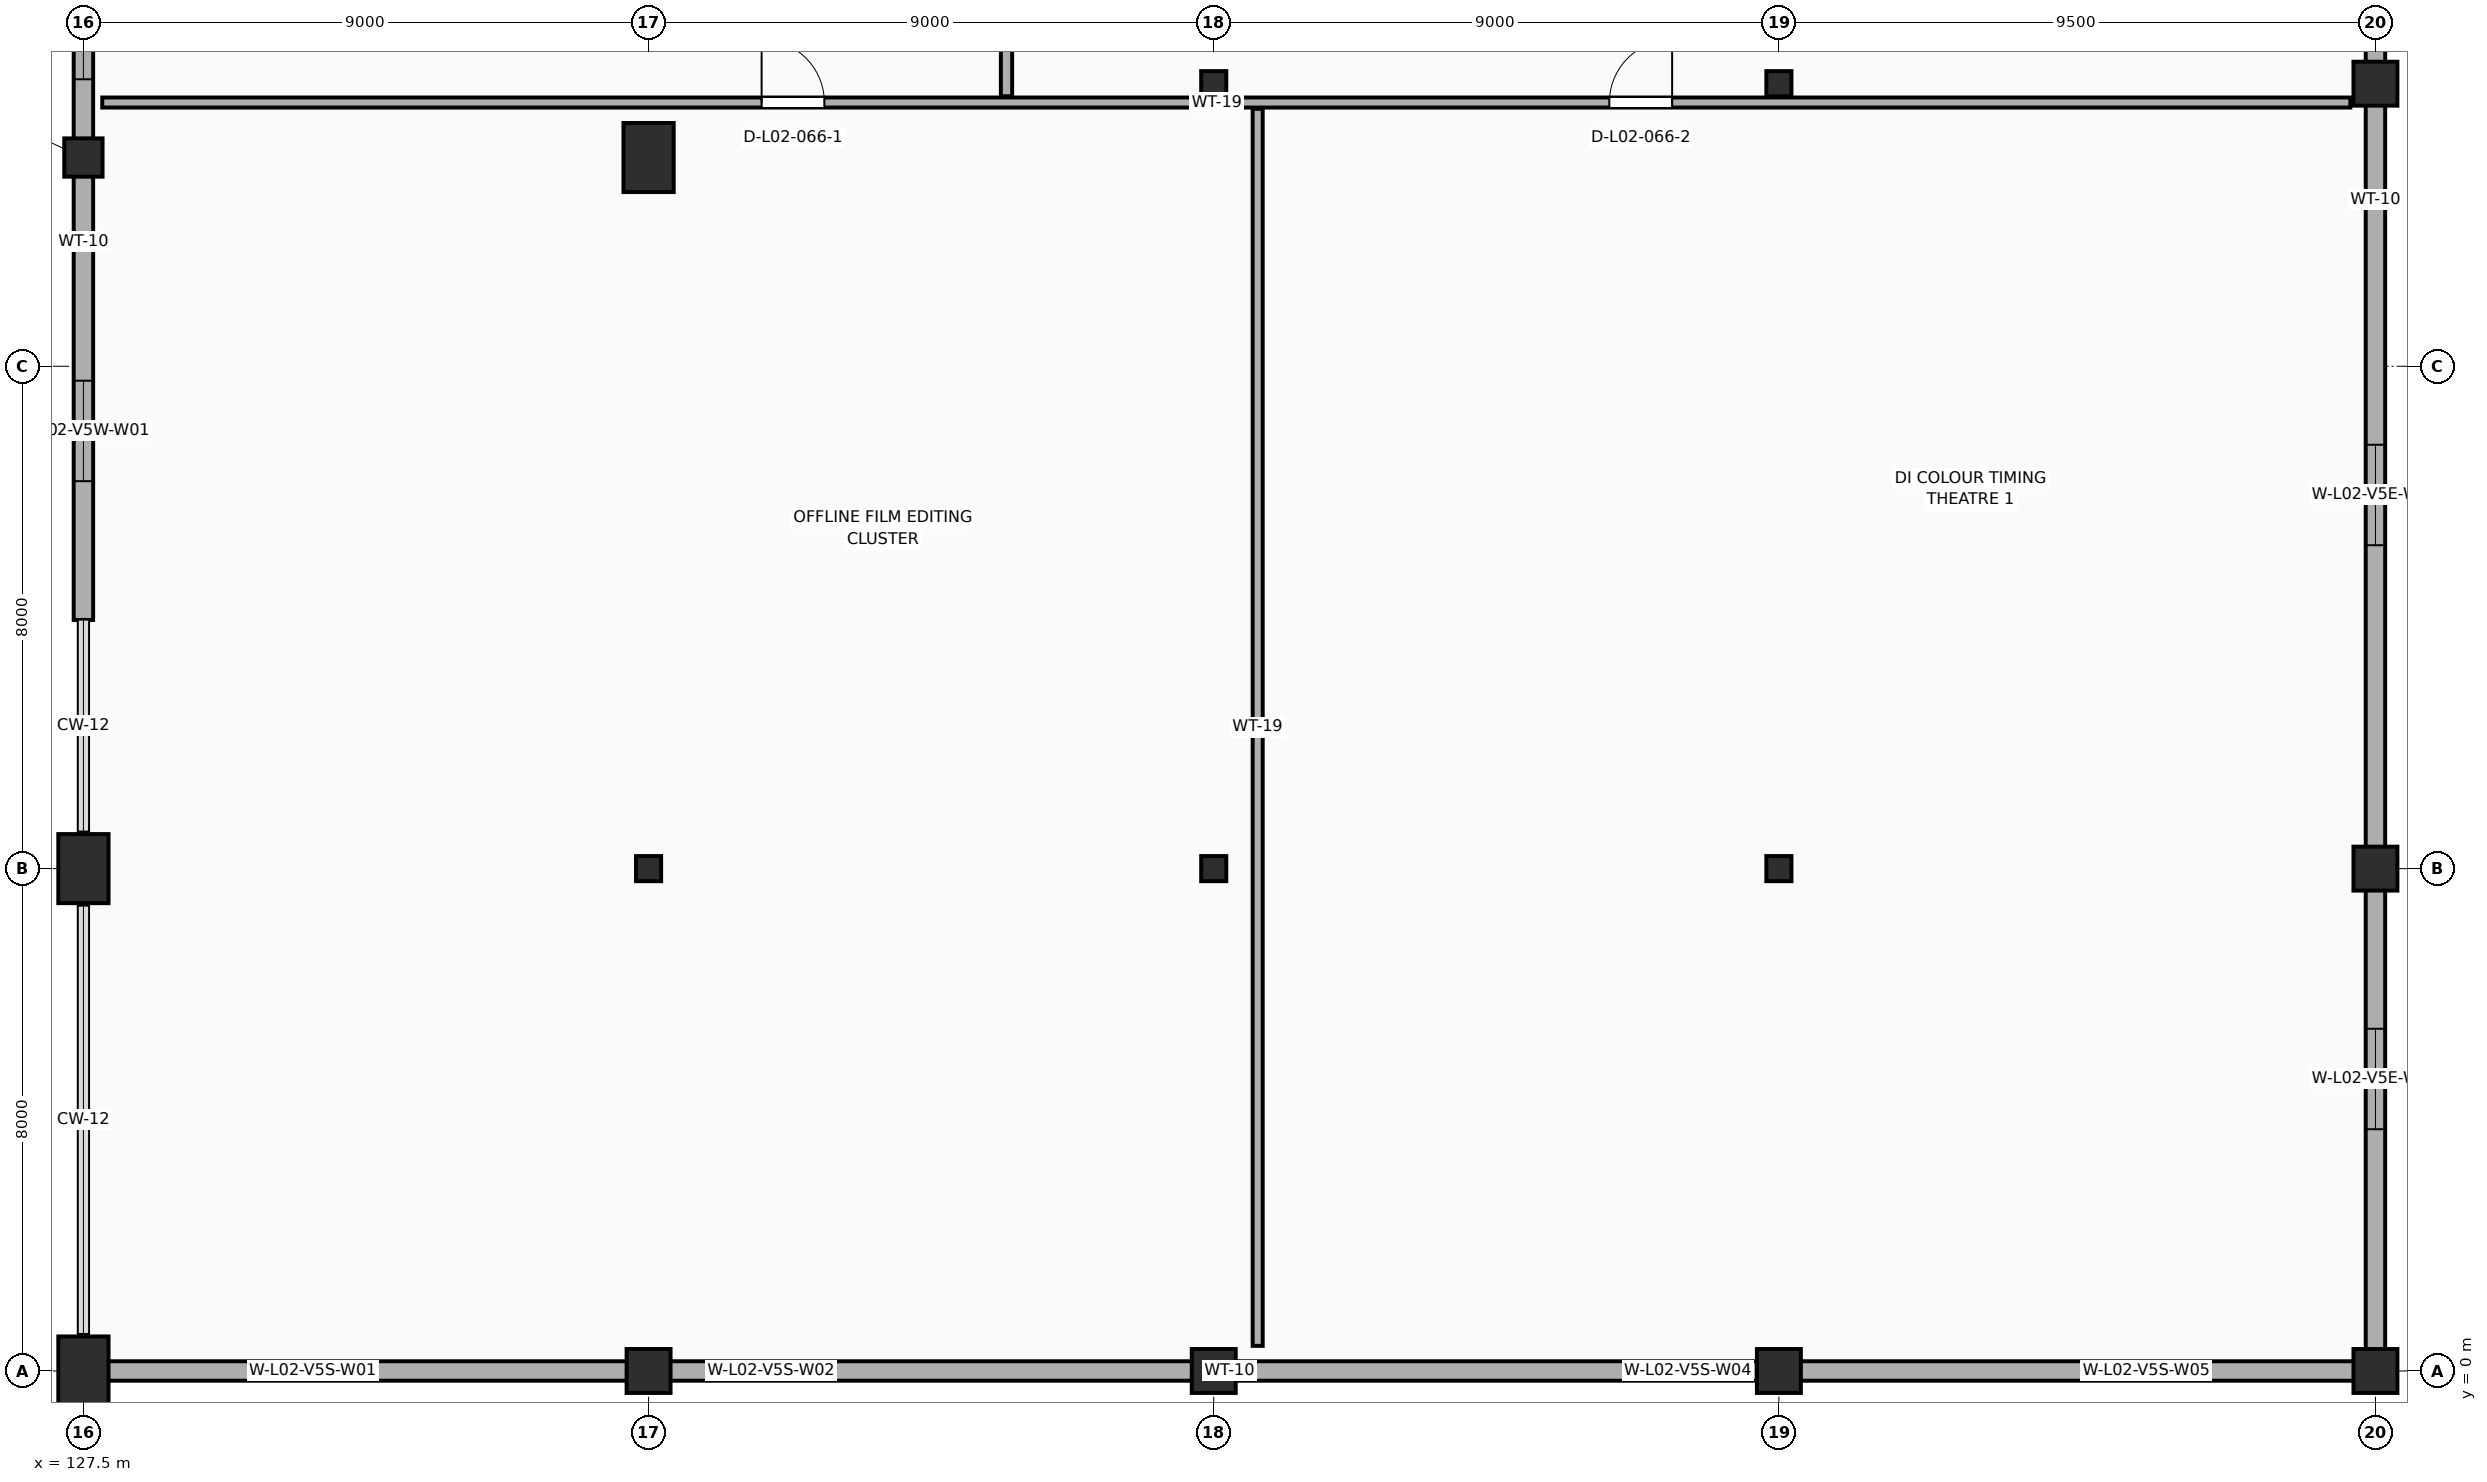
"""IFC4 building model, lengths in metres.
Left out: names, types, materials, properties, quantities, classifications, styles, units other than length and angle.
Written with IfcOpenShell. Run it as: python <this file> out.ifc"""

import sys

from ifc_helpers import new_model, si_unit, direction, frame, frame_2d, origin, origin_2d, place, context, subcontext, project, spatial, rectangle, hollow_rectangle, hollow_circle, extrude, element, fill, save


model = new_model("IFC4")
c1 = context("Model", 3, precision=1e-05, world=origin(), true_north=direction((0.0, 1.0)))
c2 = subcontext(c1, "Body", "Model", "MODEL_VIEW")
j1 = project(units=[si_unit("LENGTHUNIT", "METRE"), si_unit("PLANEANGLEUNIT", "RADIAN")], contexts=[c1])
p1 = place(None, origin())
s1 = spatial("IfcSite", under=j1, at=p1, CompositionType="ELEMENT")
p2 = place(p1, origin())
s2 = spatial("IfcBuilding", under=s1, at=p2, CompositionType="ELEMENT")
p3 = place(p2, frame((0.0, 0.0, 10.2)))
s3 = spatial("IfcBuildingStorey", under=s2, at=p3, CompositionType="ELEMENT", Elevation=10.2)
for number, where, z_axis, x_axis in (
    (1, (127.5, 0.0, 0.0), (0.0, 0.0, 1.0), (1.0, 0.0, 0.0)),
    (2, (127.5, 8.0, 0.0), (0.0, 0.0, 1.0), (1.0, 0.0, 0.0)),
):
    element("IfcColumn", number, at=place(p3, frame(where, z_axis=z_axis, x_axis=x_axis)), inside=s3, PredefinedType="COLUMN", context=c2, shape_type="SweptSolid", body=[
        extrude(rectangle(XDim=0.8, YDim=1.1, at=origin_2d()), origin(), (0.0, 0.0, 1.0), 4.53),
    ])
p4 = place(p3, frame((136.5, 0.0, 0.0), z_axis=(0.0, 0.0, 1.0), x_axis=(1.0, 0.0, 0.0)))
e3 = element("IfcColumn", 3, at=p4, inside=s3, PredefinedType="COLUMN", context=c2, shape_type="SweptSolid", body=[
    extrude(rectangle(XDim=0.7, YDim=0.7, at=origin_2d()), origin(), (0.0, 0.0, 1.0), 4.53),
])
p5 = place(p3, frame((136.5, 8.0, 0.0), z_axis=(0.0, 0.0, 1.0), x_axis=(1.0, 0.0, 0.0)))
e4 = element("IfcColumn", 4, at=p5, inside=s3, PredefinedType="COLUMN", context=c2, shape_type="SweptSolid", body=[
    extrude(hollow_rectangle(XDim=0.4, YDim=0.4, WallThickness=0.016, at=origin_2d()), origin(), (0.0, 0.0, 1.0), 4.53),
])
p6 = place(p3, frame((145.5, 0.0, 0.0), z_axis=(0.0, 0.0, 1.0), x_axis=(1.0, 0.0, 0.0)))
e5 = element("IfcColumn", 5, at=p6, inside=s3, PredefinedType="COLUMN", context=c2, shape_type="SweptSolid", body=[
    extrude(rectangle(XDim=0.7, YDim=0.7, at=origin_2d()), origin(), (0.0, 0.0, 1.0), 4.53),
])
p7 = place(p3, frame((145.5, 8.0, 0.0), z_axis=(0.0, 0.0, 1.0), x_axis=(1.0, 0.0, 0.0)))
e6 = element("IfcColumn", 6, at=p7, inside=s3, PredefinedType="COLUMN", context=c2, shape_type="SweptSolid", body=[
    extrude(hollow_rectangle(XDim=0.4, YDim=0.4, WallThickness=0.016, at=origin_2d()), origin(), (0.0, 0.0, 1.0), 4.53),
])
p8 = place(p3, frame((145.5, 20.5, 0.0), z_axis=(0.0, 0.0, 1.0), x_axis=(1.0, 0.0, 0.0)))
e7 = element("IfcColumn", 7, at=p8, inside=s3, PredefinedType="COLUMN", context=c2, shape_type="SweptSolid", body=[
    extrude(hollow_rectangle(XDim=0.4, YDim=0.4, WallThickness=0.016, at=origin_2d()), origin(), (0.0, 0.0, 1.0), 4.54),
])
p9 = place(p3, frame((154.5, 0.0, 0.0), z_axis=(0.0, 0.0, 1.0), x_axis=(1.0, 0.0, 0.0)))
e8 = element("IfcColumn", 8, at=p9, inside=s3, PredefinedType="COLUMN", context=c2, shape_type="SweptSolid", body=[
    extrude(rectangle(XDim=0.7, YDim=0.7, at=origin_2d()), origin(), (0.0, 0.0, 1.0), 4.53),
])
p10 = place(p3, frame((154.5, 8.0, 0.0), z_axis=(0.0, 0.0, 1.0), x_axis=(1.0, 0.0, 0.0)))
e9 = element("IfcColumn", 9, at=p10, inside=s3, PredefinedType="COLUMN", context=c2, shape_type="SweptSolid", body=[
    extrude(hollow_rectangle(XDim=0.4, YDim=0.4, WallThickness=0.016, at=origin_2d()), origin(), (0.0, 0.0, 1.0), 4.53),
])
p11 = place(p3, frame((154.5, 20.5, 0.0), z_axis=(0.0, 0.0, 1.0), x_axis=(1.0, 0.0, 0.0)))
e10 = element("IfcColumn", 10, at=p11, inside=s3, PredefinedType="COLUMN", context=c2, shape_type="SweptSolid", body=[
    extrude(hollow_rectangle(XDim=0.4, YDim=0.4, WallThickness=0.016, at=origin_2d()), origin(), (0.0, 0.0, 1.0), 4.54),
])
for number, where, z_axis, x_axis in (
    (11, (164.0, 0.0, 0.0), (0.0, 0.0, 1.0), (1.0, 0.0, 0.0)),
    (12, (164.0, 8.0, 0.0), (0.0, 0.0, 1.0), (1.0, 0.0, 0.0)),
):
    element("IfcColumn", number, at=place(p3, frame(where, z_axis=z_axis, x_axis=x_axis)), inside=s3, PredefinedType="COLUMN", context=c2, shape_type="SweptSolid", body=[
        extrude(rectangle(XDim=0.7, YDim=0.7, at=origin_2d()), origin(), (0.0, 0.0, 1.0), 4.53),
    ])
p12 = place(p3, frame((164.0, 20.5, 0.0), z_axis=(0.0, 0.0, 1.0), x_axis=(1.0, 0.0, 0.0)))
e13 = element("IfcColumn", 13, at=p12, inside=s3, PredefinedType="COLUMN", context=c2, shape_type="SweptSolid", body=[
    extrude(rectangle(XDim=0.7, YDim=0.7, at=origin_2d()), origin(), (0.0, 0.0, 1.0), 4.54),
])
p13 = place(p3, frame((136.5, 19.324, 0.0), z_axis=(0.0, 0.0, 1.0), x_axis=(1.0, 0.0, 0.0)))
e14 = element("IfcColumn", 14, at=p13, inside=s3, PredefinedType="COLUMN", context=c2, shape_type="SweptSolid", body=[
    extrude(rectangle(XDim=0.8, YDim=1.1, at=origin_2d()), origin(), (0.0, 0.0, 1.0), 4.53),
])
p14 = place(p3, frame((127.5, 19.324, 0.0), z_axis=(0.0, 0.0, 1.0), x_axis=(1.0, 0.0, 0.0)))
e15 = element("IfcColumn", 15, at=p14, inside=s3, PredefinedType="COLUMN", context=c2, shape_type="SweptSolid", body=[
    extrude(hollow_circle(Radius=0.305, WallThickness=0.02, at=origin_2d()), origin(), (0.0, 0.0, 1.0), 4.53),
])
p15 = place(p3, frame((127.5, 11.96, 0.0), z_axis=(0.0, 0.0, 1.0), x_axis=(0.0, 1.0, 0.0)))
e16 = element("IfcWall", 16, at=p15, inside=s3, PredefinedType="STANDARD", context=c2, shape_type="SweptSolid", body=[
    extrude(rectangle(XDim=12.04, YDim=0.31, at=frame_2d((6.02, 0.0))), origin(), (0.0, 0.0, 1.0), 3.72),
])
p16 = place(p15, frame((2.21, 0.0, 1.0)))
e17 = element("IfcOpeningElement", 17, at=p16, cuts=e16, PredefinedType="OPENING", context=c2, shape_type="SweptSolid", body=[
    extrude(rectangle(XDim=1.6, YDim=2.2, at=frame_2d((0.8, 1.1))), frame((0.0, 0.167, 0.0), z_axis=(0.0, -1.0, 0.0), x_axis=(1.0, 0.0, 0.0)), (0.0, 0.0, 1.0), 0.334),
])
p17 = place(p15, frame((8.61, 0.0, 1.0)))
e18 = element("IfcOpeningElement", 18, at=p17, cuts=e16, PredefinedType="OPENING", context=c2, shape_type="SweptSolid", body=[
    extrude(rectangle(XDim=1.6, YDim=2.2, at=frame_2d((0.8, 1.1))), frame((0.0, 0.167, 0.0), z_axis=(0.0, -1.0, 0.0), x_axis=(1.0, 0.0, 0.0)), (0.0, 0.0, 1.0), 0.334),
])
p18 = place(p3, frame((127.5, 0.0, 0.0), z_axis=(0.0, 0.0, 1.0), x_axis=(1.0, 0.0, 0.0)))
e19 = element("IfcWall", 19, at=p18, inside=s3, PredefinedType="STANDARD", context=c2, shape_type="SweptSolid", body=[
    extrude(rectangle(XDim=36.5, YDim=0.31, at=frame_2d((18.25, 0.0))), origin(), (0.0, 0.0, 1.0), 3.67),
])
p19 = place(p18, frame((2.85, 0.0, 1.0)))
e20 = element("IfcOpeningElement", 20, at=p19, cuts=e19, PredefinedType="OPENING", context=c2, shape_type="SweptSolid", body=[
    extrude(rectangle(XDim=1.6, YDim=2.2, at=frame_2d((0.8, 1.1))), frame((0.0, 0.167, 0.0), z_axis=(0.0, -1.0, 0.0), x_axis=(1.0, 0.0, 0.0)), (0.0, 0.0, 1.0), 0.334),
])
p20 = place(p18, frame((10.15, 0.0, 1.0)))
e21 = element("IfcOpeningElement", 21, at=p20, cuts=e19, PredefinedType="OPENING", context=c2, shape_type="SweptSolid", body=[
    extrude(rectangle(XDim=1.6, YDim=2.2, at=frame_2d((0.8, 1.1))), frame((0.0, 0.167, 0.0), z_axis=(0.0, -1.0, 0.0), x_axis=(1.0, 0.0, 0.0)), (0.0, 0.0, 1.0), 0.334),
])
p21 = place(p18, frame((24.75, 0.0, 1.0)))
e22 = element("IfcOpeningElement", 22, at=p21, cuts=e19, PredefinedType="OPENING", context=c2, shape_type="SweptSolid", body=[
    extrude(rectangle(XDim=1.6, YDim=2.2, at=frame_2d((0.8, 1.1))), frame((0.0, 0.167, 0.0), z_axis=(0.0, -1.0, 0.0), x_axis=(1.0, 0.0, 0.0)), (0.0, 0.0, 1.0), 0.334),
])
p22 = place(p18, frame((32.05, 0.0, 1.0)))
e23 = element("IfcOpeningElement", 23, at=p22, cuts=e19, PredefinedType="OPENING", context=c2, shape_type="SweptSolid", body=[
    extrude(rectangle(XDim=1.6, YDim=2.2, at=frame_2d((0.8, 1.1))), frame((0.0, 0.167, 0.0), z_axis=(0.0, -1.0, 0.0), x_axis=(1.0, 0.0, 0.0)), (0.0, 0.0, 1.0), 0.334),
])
p23 = place(p3, frame((164.0, 0.0, 0.0), z_axis=(0.0, 0.0, 1.0), x_axis=(0.0, 1.0, 0.0)))
e24 = element("IfcWall", 24, at=p23, inside=s3, PredefinedType="STANDARD", context=c2, shape_type="SweptSolid", body=[
    extrude(rectangle(XDim=46.5, YDim=0.31, at=frame_2d((23.25, 0.0))), origin(), (0.0, 0.0, 1.0), 4.118),
])
p24 = place(p23, frame((3.85, 0.0, 1.0)))
e25 = element("IfcOpeningElement", 25, at=p24, cuts=e24, PredefinedType="OPENING", context=c2, shape_type="SweptSolid", body=[
    extrude(rectangle(XDim=1.6, YDim=2.2, at=frame_2d((0.8, 1.1))), frame((0.0, 0.167, 0.0), z_axis=(0.0, -1.0, 0.0), x_axis=(1.0, 0.0, 0.0)), (0.0, 0.0, 1.0), 0.334),
])
p25 = place(p23, frame((13.15, 0.0, 1.0)))
e26 = element("IfcOpeningElement", 26, at=p25, cuts=e24, PredefinedType="OPENING", context=c2, shape_type="SweptSolid", body=[
    extrude(rectangle(XDim=1.6, YDim=2.2, at=frame_2d((0.8, 1.1))), frame((0.0, 0.167, 0.0), z_axis=(0.0, -1.0, 0.0), x_axis=(1.0, 0.0, 0.0)), (0.0, 0.0, 1.0), 0.334),
])
p26 = place(p23, frame((22.45, 0.0, 1.0)))
e27 = element("IfcOpeningElement", 27, at=p26, cuts=e24, PredefinedType="OPENING", context=c2, shape_type="SweptSolid", body=[
    extrude(rectangle(XDim=1.6, YDim=2.2, at=frame_2d((0.8, 1.1))), frame((0.0, 0.167, 0.0), z_axis=(0.0, -1.0, 0.0), x_axis=(1.0, 0.0, 0.0)), (0.0, 0.0, 1.0), 0.334),
])
p27 = place(p23, frame((31.75, 0.0, 1.0)))
e28 = element("IfcOpeningElement", 28, at=p27, cuts=e24, PredefinedType="OPENING", context=c2, shape_type="SweptSolid", body=[
    extrude(rectangle(XDim=1.6, YDim=2.2, at=frame_2d((0.8, 1.1))), frame((0.0, 0.167, 0.0), z_axis=(0.0, -1.0, 0.0), x_axis=(1.0, 0.0, 0.0)), (0.0, 0.0, 1.0), 0.334),
])
p28 = place(p3, frame((127.8, 20.2, 0.0), z_axis=(0.0, 0.0, 1.0), x_axis=(1.0, 0.0, 0.0)))
e29 = element("IfcWall", 29, at=p28, inside=s3, PredefinedType="PARTITIONING", context=c2, shape_type="SweptSolid", body=[
    extrude(rectangle(XDim=35.8, YDim=0.16, at=frame_2d((17.9, 0.0))), origin(), (0.0, 0.0, 1.0), 3.72),
])
p29 = place(p28, frame((10.5, 0.0, 0.0)))
e30 = element("IfcOpeningElement", 30, at=p29, cuts=e29, PredefinedType="OPENING", context=c2, shape_type="SweptSolid", body=[
    extrude(rectangle(XDim=1.0, YDim=2.15, at=frame_2d((0.5, 1.075))), frame((0.0, 0.092, 0.0), z_axis=(0.0, -1.0, 0.0), x_axis=(1.0, 0.0, 0.0)), (0.0, 0.0, 1.0), 0.184),
])
p30 = place(p28, frame((24.0, 0.0, 0.0)))
e31 = element("IfcOpeningElement", 31, at=p30, cuts=e29, PredefinedType="OPENING", context=c2, shape_type="SweptSolid", body=[
    extrude(rectangle(XDim=1.0, YDim=2.15, at=frame_2d((0.5, 1.075))), frame((0.0, 0.092, 0.0), z_axis=(0.0, -1.0, 0.0), x_axis=(1.0, 0.0, 0.0)), (0.0, 0.0, 1.0), 0.184),
])
p31 = place(p3, frame((146.2, 0.4, 0.0), z_axis=(0.0, 0.0, 1.0), x_axis=(0.0, 1.0, 0.0)))
e32 = element("IfcWall", 32, at=p31, inside=s3, PredefinedType="PARTITIONING", context=c2, shape_type="SweptSolid", body=[
    extrude(rectangle(XDim=19.7, YDim=0.16, at=frame_2d((9.85, 0.0))), origin(), (0.0, 0.0, 1.0), 4.018),
])
p32 = place(p3, frame((142.2, 20.3, 0.0), z_axis=(0.0, 0.0, 1.0), x_axis=(0.0, 1.0, 0.0)))
e33 = element("IfcWall", 33, at=p32, inside=s3, PredefinedType="PARTITIONING", context=c2, shape_type="SweptSolid", body=[
    extrude(rectangle(XDim=25.9, YDim=0.18, at=frame_2d((12.95, 0.0))), origin(), (0.0, 0.0, 1.0), 3.85),
])
p33 = place(p32, frame((6.0, 0.0, 0.0)))
e34 = element("IfcOpeningElement", 34, at=p33, cuts=e33, PredefinedType="OPENING", context=c2, shape_type="SweptSolid", body=[
    extrude(rectangle(XDim=1.0, YDim=2.15, at=frame_2d((0.5, 1.075))), frame((0.0, 0.102, 0.0), z_axis=(0.0, -1.0, 0.0), x_axis=(1.0, 0.0, 0.0)), (0.0, 0.0, 1.0), 0.204),
])
p34 = place(p32, frame((16.5, 0.0, 0.0)))
e35 = element("IfcOpeningElement", 35, at=p34, cuts=e33, PredefinedType="OPENING", context=c2, shape_type="SweptSolid", body=[
    extrude(rectangle(XDim=0.9, YDim=2.15, at=frame_2d((0.45, 1.075))), frame((0.0, 0.102, 0.0), z_axis=(0.0, -1.0, 0.0), x_axis=(1.0, 0.0, 0.0)), (0.0, 0.0, 1.0), 0.204),
])
p35 = place(p32, frame((22.5, 0.0, 0.0)))
e36 = element("IfcOpeningElement", 36, at=p35, cuts=e33, PredefinedType="OPENING", context=c2, shape_type="SweptSolid", body=[
    extrude(rectangle(XDim=0.9, YDim=2.1, at=frame_2d((0.45, 1.05))), frame((0.0, 0.102, 0.0), z_axis=(0.0, -1.0, 0.0), x_axis=(1.0, 0.0, 0.0)), (0.0, 0.0, 1.0), 0.204),
])
p36 = place(p16, origin())
e37 = element("IfcWindow", 37, at=p36, inside=s3, PartitioningType="SINGLE_PANEL", PredefinedType="WINDOW", context=c2, shape_type="SweptSolid", body=[
    extrude(rectangle(XDim=1.6, YDim=2.2, at=frame_2d((0.8, 1.1))), frame((0.0, 0.03, 0.0), z_axis=(0.0, -1.0, 0.0), x_axis=(1.0, 0.0, 0.0)), (0.0, 0.0, 1.0), 0.06),
])
fill(e17, e37)
p37 = place(p17, origin())
e38 = element("IfcWindow", 38, at=p37, inside=s3, PartitioningType="SINGLE_PANEL", PredefinedType="WINDOW", context=c2, shape_type="SweptSolid", body=[
    extrude(rectangle(XDim=1.6, YDim=2.2, at=frame_2d((0.8, 1.1))), frame((0.0, 0.03, 0.0), z_axis=(0.0, -1.0, 0.0), x_axis=(1.0, 0.0, 0.0)), (0.0, 0.0, 1.0), 0.06),
])
fill(e18, e38)
p38 = place(p19, origin())
e39 = element("IfcWindow", 39, at=p38, inside=s3, PartitioningType="SINGLE_PANEL", PredefinedType="WINDOW", context=c2, shape_type="SweptSolid", body=[
    extrude(rectangle(XDim=1.6, YDim=2.2, at=frame_2d((0.8, 1.1))), frame((0.0, 0.03, 0.0), z_axis=(0.0, -1.0, 0.0), x_axis=(1.0, 0.0, 0.0)), (0.0, 0.0, 1.0), 0.06),
])
fill(e20, e39)
p39 = place(p20, origin())
e40 = element("IfcWindow", 40, at=p39, inside=s3, PartitioningType="SINGLE_PANEL", PredefinedType="WINDOW", context=c2, shape_type="SweptSolid", body=[
    extrude(rectangle(XDim=1.6, YDim=2.2, at=frame_2d((0.8, 1.1))), frame((0.0, 0.03, 0.0), z_axis=(0.0, -1.0, 0.0), x_axis=(1.0, 0.0, 0.0)), (0.0, 0.0, 1.0), 0.06),
])
fill(e21, e40)
p40 = place(p21, origin())
e41 = element("IfcWindow", 41, at=p40, inside=s3, PartitioningType="SINGLE_PANEL", PredefinedType="WINDOW", context=c2, shape_type="SweptSolid", body=[
    extrude(rectangle(XDim=1.6, YDim=2.2, at=frame_2d((0.8, 1.1))), frame((0.0, 0.03, 0.0), z_axis=(0.0, -1.0, 0.0), x_axis=(1.0, 0.0, 0.0)), (0.0, 0.0, 1.0), 0.06),
])
fill(e22, e41)
p41 = place(p22, origin())
e42 = element("IfcWindow", 42, at=p41, inside=s3, PartitioningType="SINGLE_PANEL", PredefinedType="WINDOW", context=c2, shape_type="SweptSolid", body=[
    extrude(rectangle(XDim=1.6, YDim=2.2, at=frame_2d((0.8, 1.1))), frame((0.0, 0.03, 0.0), z_axis=(0.0, -1.0, 0.0), x_axis=(1.0, 0.0, 0.0)), (0.0, 0.0, 1.0), 0.06),
])
fill(e23, e42)
p42 = place(p24, origin())
e43 = element("IfcWindow", 43, at=p42, inside=s3, PartitioningType="SINGLE_PANEL", PredefinedType="WINDOW", context=c2, shape_type="SweptSolid", body=[
    extrude(rectangle(XDim=1.6, YDim=2.2, at=frame_2d((0.8, 1.1))), frame((0.0, 0.03, 0.0), z_axis=(0.0, -1.0, 0.0), x_axis=(1.0, 0.0, 0.0)), (0.0, 0.0, 1.0), 0.06),
])
fill(e25, e43)
p43 = place(p25, origin())
e44 = element("IfcWindow", 44, at=p43, inside=s3, PartitioningType="SINGLE_PANEL", PredefinedType="WINDOW", context=c2, shape_type="SweptSolid", body=[
    extrude(rectangle(XDim=1.6, YDim=2.2, at=frame_2d((0.8, 1.1))), frame((0.0, 0.03, 0.0), z_axis=(0.0, -1.0, 0.0), x_axis=(1.0, 0.0, 0.0)), (0.0, 0.0, 1.0), 0.06),
])
fill(e26, e44)
p44 = place(p29, origin())
e45 = element("IfcDoor", 45, at=p44, inside=s3, OperationType="SINGLE_SWING_LEFT", PredefinedType="DOOR", context=c2, shape_type="SweptSolid", body=[
    extrude(rectangle(XDim=1.0, YDim=2.15, at=frame_2d((0.5, 1.075))), frame((0.0, 0.025, 0.0), z_axis=(0.0, -1.0, 0.0), x_axis=(1.0, 0.0, 0.0)), (0.0, 0.0, 1.0), 0.05),
])
fill(e30, e45)
p45 = place(p30, origin())
e46 = element("IfcDoor", 46, at=p45, inside=s3, OperationType="SINGLE_SWING_RIGHT", PredefinedType="DOOR", context=c2, shape_type="SweptSolid", body=[
    extrude(rectangle(XDim=1.0, YDim=2.15, at=frame_2d((0.5, 1.075))), frame((0.0, 0.025, 0.0), z_axis=(0.0, -1.0, 0.0), x_axis=(1.0, 0.0, 0.0)), (0.0, 0.0, 1.0), 0.05),
])
fill(e31, e46)
save(model, sys.argv[1])
